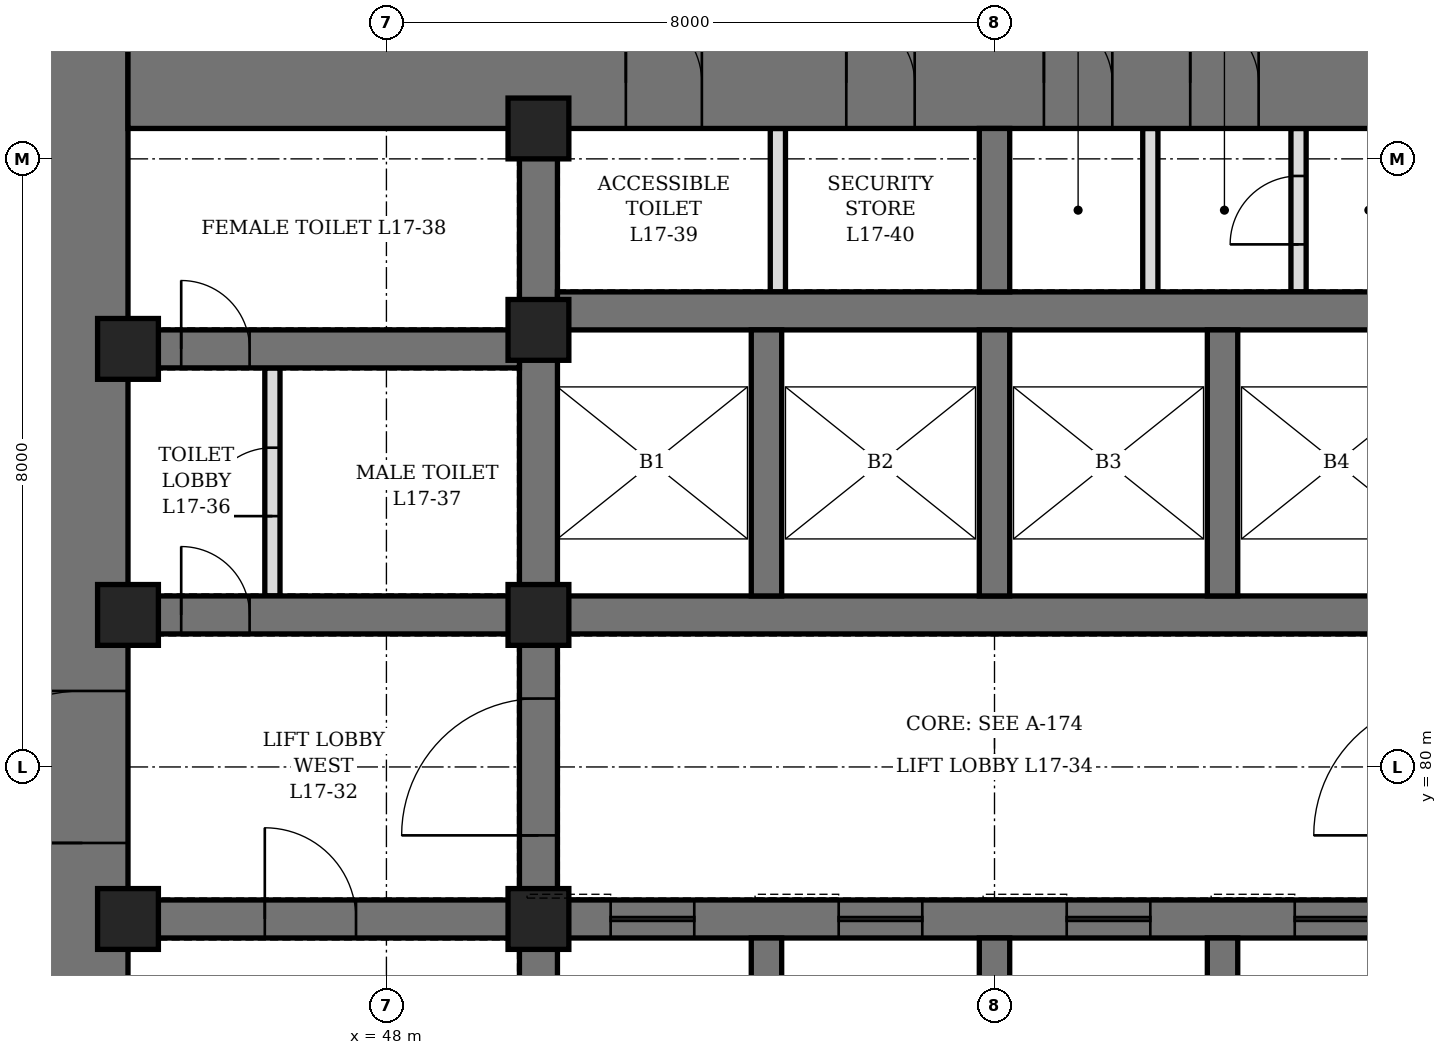
"""IFC4 building model, lengths in metres.
Left out: names, types, materials, properties, quantities, classifications, styles, units other than length and angle.
Written with IfcOpenShell. Run it as: python <this file> out.ifc"""

import sys

from ifc_helpers import new_model, si_unit, direction, frame, frame_2d, origin, origin_2d, place, context, subcontext, project, spatial, rectangle, hollow_rectangle, extrude, element, fill, save


model = new_model("IFC4")
c1 = context("Model", 3, precision=1e-05, world=origin(), true_north=direction((0.0, 1.0)))
c2 = subcontext(c1, "Body", "Model", "MODEL_VIEW")
j1 = project(units=[si_unit("LENGTHUNIT", "METRE"), si_unit("PLANEANGLEUNIT", "RADIAN")], contexts=[c1])
p1 = place(None, origin())
s1 = spatial("IfcSite", under=j1, at=p1, CompositionType="ELEMENT")
p2 = place(p1, origin())
s2 = spatial("IfcBuilding", under=s1, at=p2, CompositionType="ELEMENT")
p3 = place(p2, frame((0.0, 0.0, 81.1)))
s3 = spatial("IfcBuildingStorey", under=s2, at=p3, CompositionType="ELEMENT", Elevation=81.1)
p4 = place(p3, frame((44.0, 70.4, 0.0), z_axis=(0.0, 0.0, 1.0), x_axis=(0.0, 1.0, 0.0)))
e1 = element("IfcWall", 1, at=p4, inside=s3, PredefinedType="SHEAR", context=c2, shape_type="SweptSolid", body=[
    extrude(rectangle(XDim=19.2, YDim=1.2, at=frame_2d((9.6, 0.0))), origin(), (0.0, 0.0, 1.0), 4.2),
])
p5 = place(p4, frame((8.6, 0.0, 0.0)))
e2 = element("IfcOpeningElement", 2, at=p5, cuts=e1, PredefinedType="OPENING", context=c2, shape_type="SweptSolid", body=[
    extrude(rectangle(XDim=2.0, YDim=2.4, at=frame_2d((1.0, 1.2))), frame((0.0, 0.61, 0.0), z_axis=(0.0, -1.0, 0.0), x_axis=(1.0, 0.0, 0.0)), (0.0, 0.0, 1.0), 1.22),
])
p6 = place(p3, frame((44.6, 89.0, 0.0), z_axis=(0.0, 0.0, 1.0), x_axis=(1.0, 0.0, 0.0)))
e3 = element("IfcWall", 3, at=p6, inside=s3, PredefinedType="SHEAR", context=c2, shape_type="SweptSolid", body=[
    extrude(rectangle(XDim=22.8, YDim=1.2, at=frame_2d((11.4, 0.0))), origin(), (0.0, 0.0, 1.0), 4.2),
])
p7 = place(p6, frame((6.55, 0.0, 0.0)))
e4 = element("IfcOpeningElement", 4, at=p7, cuts=e3, PredefinedType="OPENING", context=c2, shape_type="SweptSolid", body=[
    extrude(rectangle(XDim=1.0, YDim=2.1, at=frame_2d((0.5, 1.05))), frame((0.0, 0.61, 0.0), z_axis=(0.0, -1.0, 0.0), x_axis=(1.0, 0.0, 0.0)), (0.0, 0.0, 1.0), 1.22),
])
p8 = place(p6, frame((9.45, 0.0, 0.0)))
e5 = element("IfcOpeningElement", 5, at=p8, cuts=e3, PredefinedType="OPENING", context=c2, shape_type="SweptSolid", body=[
    extrude(rectangle(XDim=0.9, YDim=2.1, at=frame_2d((0.45, 1.05))), frame((0.0, 0.61, 0.0), z_axis=(0.0, -1.0, 0.0), x_axis=(1.0, 0.0, 0.0)), (0.0, 0.0, 1.0), 1.22),
])
p9 = place(p6, frame((12.05, 0.0, 0.0)))
e6 = element("IfcOpeningElement", 6, at=p9, cuts=e3, PredefinedType="OPENING", context=c2, shape_type="SweptSolid", body=[
    extrude(rectangle(XDim=0.9, YDim=2.1, at=frame_2d((0.45, 1.05))), frame((0.0, 0.61, 0.0), z_axis=(0.0, -1.0, 0.0), x_axis=(1.0, 0.0, 0.0)), (0.0, 0.0, 1.0), 1.22),
])
p10 = place(p6, frame((13.975, 0.0, 0.0)))
e7 = element("IfcOpeningElement", 7, at=p10, cuts=e3, PredefinedType="OPENING", context=c2, shape_type="SweptSolid", body=[
    extrude(rectangle(XDim=0.9, YDim=2.1, at=frame_2d((0.45, 1.05))), frame((0.0, 0.61, 0.0), z_axis=(0.0, -1.0, 0.0), x_axis=(1.0, 0.0, 0.0)), (0.0, 0.0, 1.0), 1.22),
])
p11 = place(p3, frame((50.0, 71.6, 0.0), z_axis=(0.0, 0.0, 1.0), x_axis=(0.0, 1.0, 0.0)))
e8 = element("IfcWall", 8, at=p11, inside=s3, PredefinedType="SHEAR", context=c2, shape_type="SweptSolid", body=[
    extrude(rectangle(XDim=16.8, YDim=0.5, at=frame_2d((8.4, 0.0))), origin(), (0.0, 0.0, 1.0), 4.2),
])
p12 = place(p11, frame((7.5, 0.0, 0.0)))
e9 = element("IfcOpeningElement", 9, at=p12, cuts=e8, PredefinedType="OPENING", context=c2, shape_type="SweptSolid", body=[
    extrude(rectangle(XDim=1.8, YDim=2.4, at=frame_2d((0.9, 1.2))), frame((0.0, 0.26, 0.0), z_axis=(0.0, -1.0, 0.0), x_axis=(1.0, 0.0, 0.0)), (0.0, 0.0, 1.0), 0.52),
])
p13 = place(p3, frame((44.6, 78.0, 0.0), z_axis=(0.0, 0.0, 1.0), x_axis=(1.0, 0.0, 0.0)))
e10 = element("IfcWall", 10, at=p13, inside=s3, PredefinedType="SHEAR", context=c2, shape_type="SweptSolid", body=[
    extrude(rectangle(XDim=5.15, YDim=0.5, at=frame_2d((2.575, 0.0))), origin(), (0.0, 0.0, 1.0), 4.2),
])
p14 = place(p13, frame((1.8, 0.0, 0.0)))
e11 = element("IfcOpeningElement", 11, at=p14, cuts=e10, PredefinedType="OPENING", context=c2, shape_type="SweptSolid", body=[
    extrude(rectangle(XDim=1.2, YDim=2.1, at=frame_2d((0.6, 1.05))), frame((0.0, 0.26, 0.0), z_axis=(0.0, -1.0, 0.0), x_axis=(1.0, 0.0, 0.0)), (0.0, 0.0, 1.0), 0.52),
])
p15 = place(p3, frame((44.6, 82.0, 0.0), z_axis=(0.0, 0.0, 1.0), x_axis=(1.0, 0.0, 0.0)))
e12 = element("IfcWall", 12, at=p15, inside=s3, PredefinedType="SHEAR", context=c2, shape_type="SweptSolid", body=[
    extrude(rectangle(XDim=5.15, YDim=0.5, at=frame_2d((2.575, 0.0))), origin(), (0.0, 0.0, 1.0), 4.2),
])
p16 = place(p15, frame((0.7, 0.0, 0.0)))
e13 = element("IfcOpeningElement", 13, at=p16, cuts=e12, PredefinedType="OPENING", context=c2, shape_type="SweptSolid", body=[
    extrude(rectangle(XDim=0.9, YDim=2.1, at=frame_2d((0.45, 1.05))), frame((0.0, 0.26, 0.0), z_axis=(0.0, -1.0, 0.0), x_axis=(1.0, 0.0, 0.0)), (0.0, 0.0, 1.0), 0.52),
])
p17 = place(p3, frame((44.6, 85.5, 0.0), z_axis=(0.0, 0.0, 1.0), x_axis=(1.0, 0.0, 0.0)))
e14 = element("IfcWall", 14, at=p17, inside=s3, PredefinedType="SHEAR", context=c2, shape_type="SweptSolid", body=[
    extrude(rectangle(XDim=5.15, YDim=0.5, at=frame_2d((2.575, 0.0))), origin(), (0.0, 0.0, 1.0), 4.2),
])
p18 = place(p17, frame((0.7, 0.0, 0.0)))
e15 = element("IfcOpeningElement", 15, at=p18, cuts=e14, PredefinedType="OPENING", context=c2, shape_type="SweptSolid", body=[
    extrude(rectangle(XDim=0.9, YDim=2.1, at=frame_2d((0.45, 1.05))), frame((0.0, 0.26, 0.0), z_axis=(0.0, -1.0, 0.0), x_axis=(1.0, 0.0, 0.0)), (0.0, 0.0, 1.0), 0.52),
])
p19 = place(p3, frame((50.25, 78.0, 0.0), z_axis=(0.0, 0.0, 1.0), x_axis=(1.0, 0.0, 0.0)))
e16 = element("IfcWall", 16, at=p19, inside=s3, PredefinedType="SHEAR", context=c2, shape_type="SweptSolid", body=[
    extrude(rectangle(XDim=11.5, YDim=0.5, at=frame_2d((5.75, 0.0))), origin(), (0.0, 0.0, 1.0), 4.2),
])
p20 = place(p19, frame((0.7, 0.0, 0.0)))
e17 = element("IfcOpeningElement", 17, at=p20, cuts=e16, PredefinedType="OPENING", context=c2, shape_type="SweptSolid", body=[
    extrude(rectangle(XDim=1.1, YDim=2.2, at=frame_2d((0.55, 1.1))), frame((0.0, 0.26, 0.0), z_axis=(0.0, -1.0, 0.0), x_axis=(1.0, 0.0, 0.0)), (0.0, 0.0, 1.0), 0.52),
])
p21 = place(p19, frame((3.7, 0.0, 0.0)))
e18 = element("IfcOpeningElement", 18, at=p21, cuts=e16, PredefinedType="OPENING", context=c2, shape_type="SweptSolid", body=[
    extrude(rectangle(XDim=1.1, YDim=2.2, at=frame_2d((0.55, 1.1))), frame((0.0, 0.26, 0.0), z_axis=(0.0, -1.0, 0.0), x_axis=(1.0, 0.0, 0.0)), (0.0, 0.0, 1.0), 0.52),
])
p22 = place(p19, frame((6.7, 0.0, 0.0)))
e19 = element("IfcOpeningElement", 19, at=p22, cuts=e16, PredefinedType="OPENING", context=c2, shape_type="SweptSolid", body=[
    extrude(rectangle(XDim=1.1, YDim=2.2, at=frame_2d((0.55, 1.1))), frame((0.0, 0.26, 0.0), z_axis=(0.0, -1.0, 0.0), x_axis=(1.0, 0.0, 0.0)), (0.0, 0.0, 1.0), 0.52),
])
p23 = place(p19, frame((9.7, 0.0, 0.0)))
e20 = element("IfcOpeningElement", 20, at=p23, cuts=e16, PredefinedType="OPENING", context=c2, shape_type="SweptSolid", body=[
    extrude(rectangle(XDim=1.1, YDim=2.2, at=frame_2d((0.55, 1.1))), frame((0.0, 0.26, 0.0), z_axis=(0.0, -1.0, 0.0), x_axis=(1.0, 0.0, 0.0)), (0.0, 0.0, 1.0), 0.52),
])
for number, where, z_axis, x_axis in (
    (21, (50.25, 82.0, 0.0), (0.0, 0.0, 1.0), (1.0, 0.0, 0.0)),
    (22, (50.25, 86.0, 0.0), (0.0, 0.0, 1.0), (1.0, 0.0, 0.0)),
):
    element("IfcWall", number, at=place(p3, frame(where, z_axis=z_axis, x_axis=x_axis)), inside=s3, PredefinedType="SHEAR", context=c2, shape_type="SweptSolid", body=[
        extrude(rectangle(XDim=11.5, YDim=0.5, at=frame_2d((5.75, 0.0))), origin(), (0.0, 0.0, 1.0), 4.2),
    ])
p24 = place(p3, frame((53.0, 74.2, 0.0), z_axis=(0.0, 0.0, 1.0), x_axis=(0.0, 1.0, 0.0)))
e23 = element("IfcWall", 23, at=p24, inside=s3, PredefinedType="SHEAR", context=c2, shape_type="SweptSolid", body=[
    extrude(rectangle(XDim=3.55, YDim=0.4, at=frame_2d((1.775, 0.0))), origin(), (0.0, 0.0, 1.0), 4.2),
])
p25 = place(p3, frame((53.0, 82.25, 0.0), z_axis=(0.0, 0.0, 1.0), x_axis=(0.0, 1.0, 0.0)))
e24 = element("IfcWall", 24, at=p25, inside=s3, PredefinedType="SHEAR", context=c2, shape_type="SweptSolid", body=[
    extrude(rectangle(XDim=3.5, YDim=0.4, at=frame_2d((1.75, 0.0))), origin(), (0.0, 0.0, 1.0), 4.2),
])
p26 = place(p3, frame((56.0, 74.2, 0.0), z_axis=(0.0, 0.0, 1.0), x_axis=(0.0, 1.0, 0.0)))
e25 = element("IfcWall", 25, at=p26, inside=s3, PredefinedType="SHEAR", context=c2, shape_type="SweptSolid", body=[
    extrude(rectangle(XDim=3.55, YDim=0.4, at=frame_2d((1.775, 0.0))), origin(), (0.0, 0.0, 1.0), 4.2),
])
p27 = place(p3, frame((56.0, 82.25, 0.0), z_axis=(0.0, 0.0, 1.0), x_axis=(0.0, 1.0, 0.0)))
e26 = element("IfcWall", 26, at=p27, inside=s3, PredefinedType="SHEAR", context=c2, shape_type="SweptSolid", body=[
    extrude(rectangle(XDim=3.5, YDim=0.4, at=frame_2d((1.75, 0.0))), origin(), (0.0, 0.0, 1.0), 4.2),
])
p28 = place(p3, frame((59.0, 74.2, 0.0), z_axis=(0.0, 0.0, 1.0), x_axis=(0.0, 1.0, 0.0)))
e27 = element("IfcWall", 27, at=p28, inside=s3, PredefinedType="SHEAR", context=c2, shape_type="SweptSolid", body=[
    extrude(rectangle(XDim=3.55, YDim=0.4, at=frame_2d((1.775, 0.0))), origin(), (0.0, 0.0, 1.0), 4.2),
])
p29 = place(p3, frame((59.0, 82.25, 0.0), z_axis=(0.0, 0.0, 1.0), x_axis=(0.0, 1.0, 0.0)))
e28 = element("IfcWall", 28, at=p29, inside=s3, PredefinedType="SHEAR", context=c2, shape_type="SweptSolid", body=[
    extrude(rectangle(XDim=3.5, YDim=0.4, at=frame_2d((1.75, 0.0))), origin(), (0.0, 0.0, 1.0), 4.2),
])
p30 = place(p3, frame((56.0, 86.25, 0.0), z_axis=(0.0, 0.0, 1.0), x_axis=(0.0, 1.0, 0.0)))
e29 = element("IfcWall", 29, at=p30, inside=s3, PredefinedType="SHEAR", context=c2, shape_type="SweptSolid", body=[
    extrude(rectangle(XDim=2.15, YDim=0.4, at=frame_2d((1.075, 0.0))), origin(), (0.0, 0.0, 1.0), 4.2),
])
for number, where, z_axis, x_axis in (
    (30, (44.6, 78.0, 0.0), (0.0, 0.0, 1.0), (1.0, 0.0, 0.0)),
    (31, (44.6, 82.0, 0.0), (0.0, 0.0, 1.0), (1.0, 0.0, 0.0)),
    (32, (44.6, 85.5, 0.0), (0.0, 0.0, 1.0), (1.0, 0.0, 0.0)),
    (33, (50.0, 78.0, 0.0), (0.0, 0.0, 1.0), (1.0, 0.0, 0.0)),
    (34, (50.0, 82.0, 0.0), (0.0, 0.0, 1.0), (1.0, 0.0, 0.0)),
    (35, (50.0, 85.75, 0.0), (0.0, 0.0, 1.0), (1.0, 0.0, 0.0)),
    (36, (50.0, 88.4, 0.0), (0.0, 0.0, 1.0), (1.0, 0.0, 0.0)),
):
    element("IfcColumn", number, at=place(p3, frame(where, z_axis=z_axis, x_axis=x_axis)), inside=s3, PredefinedType="COLUMN", context=c2, shape_type="SweptSolid", body=[
        extrude(hollow_rectangle(XDim=0.8, YDim=0.8, WallThickness=0.1, at=origin_2d()), origin(), (0.0, 0.0, 1.0), 4.2),
    ])
p31 = place(p3, frame((46.5, 82.25, 0.0), z_axis=(0.0, 0.0, 1.0), x_axis=(0.0, 1.0, 0.0)))
e37 = element("IfcWall", 37, at=p31, inside=s3, PredefinedType="PARTITIONING", context=c2, shape_type="SweptSolid", body=[
    extrude(rectangle(XDim=3.0, YDim=0.2, at=frame_2d((1.5, 0.0))), origin(), (0.0, 0.0, 1.0), 4.04),
])
p32 = place(p31, frame((1.05, 0.0, 0.0)))
e38 = element("IfcOpeningElement", 38, at=p32, cuts=e37, PredefinedType="OPENING", context=c2, shape_type="SweptSolid", body=[
    extrude(rectangle(XDim=0.9, YDim=2.1, at=frame_2d((0.45, 1.05))), frame((0.0, 0.11, 0.0), z_axis=(0.0, -1.0, 0.0), x_axis=(1.0, 0.0, 0.0)), (0.0, 0.0, 1.0), 0.22),
])
p33 = place(p3, frame((53.15, 86.25, 0.0), z_axis=(0.0, 0.0, 1.0), x_axis=(0.0, 1.0, 0.0)))
e39 = element("IfcWall", 39, at=p33, inside=s3, PredefinedType="PARTITIONING", context=c2, shape_type="SweptSolid", body=[
    extrude(rectangle(XDim=2.15, YDim=0.2, at=frame_2d((1.075, 0.0))), origin(), (0.0, 0.0, 1.0), 3.14),
])
p34 = place(p3, frame((60.0, 86.25, 0.0), z_axis=(0.0, 0.0, 1.0), x_axis=(0.0, 1.0, 0.0)))
e40 = element("IfcWall", 40, at=p34, inside=s3, PredefinedType="PARTITIONING", context=c2, shape_type="SweptSolid", body=[
    extrude(rectangle(XDim=2.15, YDim=0.2, at=frame_2d((1.075, 0.0))), origin(), (0.0, 0.0, 1.0), 4.04),
])
p35 = place(p34, frame((0.625, 0.0, 0.0)))
e41 = element("IfcOpeningElement", 41, at=p35, cuts=e40, PredefinedType="OPENING", context=c2, shape_type="SweptSolid", body=[
    extrude(rectangle(XDim=0.9, YDim=2.1, at=frame_2d((0.45, 1.05))), frame((0.0, 0.11, 0.0), z_axis=(0.0, -1.0, 0.0), x_axis=(1.0, 0.0, 0.0)), (0.0, 0.0, 1.0), 0.22),
])
p36 = place(p3, frame((58.05, 86.25, 0.0), z_axis=(0.0, 0.0, 1.0), x_axis=(0.0, 1.0, 0.0)))
e42 = element("IfcWall", 42, at=p36, inside=s3, PredefinedType="PARTITIONING", context=c2, shape_type="SweptSolid", body=[
    extrude(rectangle(XDim=2.15, YDim=0.2, at=frame_2d((1.075, 0.0))), origin(), (0.0, 0.0, 1.0), 4.04),
])
p37 = place(p16, origin())
e43 = element("IfcDoor", 43, at=p37, inside=s3, OperationType="SINGLE_SWING_LEFT", PredefinedType="DOOR", context=c2, shape_type="SweptSolid", body=[
    extrude(rectangle(XDim=0.9, YDim=2.1, at=frame_2d((0.45, 1.05))), frame((0.0, 0.25, 0.0), z_axis=(0.0, -1.0, 0.0), x_axis=(1.0, 0.0, 0.0)), (0.0, 0.0, 1.0), 0.5),
])
fill(e13, e43)
p38 = place(p32, origin())
e44 = element("IfcDoor", 44, at=p38, inside=s3, OperationType="SINGLE_SWING_RIGHT", PredefinedType="DOOR", context=c2, shape_type="SweptSolid", body=[
    extrude(rectangle(XDim=0.9, YDim=2.1, at=frame_2d((0.45, 1.05))), frame((0.0, 0.1, 0.0), z_axis=(0.0, -1.0, 0.0), x_axis=(1.0, 0.0, 0.0)), (0.0, 0.0, 1.0), 0.199),
])
fill(e38, e44)
p39 = place(p18, origin())
e45 = element("IfcDoor", 45, at=p39, inside=s3, OperationType="SINGLE_SWING_RIGHT", PredefinedType="DOOR", context=c2, shape_type="SweptSolid", body=[
    extrude(rectangle(XDim=0.9, YDim=2.1, at=frame_2d((0.45, 1.05))), frame((0.0, 0.25, 0.0), z_axis=(0.0, -1.0, 0.0), x_axis=(1.0, 0.0, 0.0)), (0.0, 0.0, 1.0), 0.5),
])
fill(e15, e45)
p40 = place(p7, origin())
e46 = element("IfcDoor", 46, at=p40, inside=s3, OperationType="SINGLE_SWING_LEFT", PredefinedType="DOOR", context=c2, shape_type="SweptSolid", body=[
    extrude(rectangle(XDim=1.0, YDim=2.1, at=frame_2d((0.5, 1.05))), frame((0.0, 0.35, 0.0), z_axis=(0.0, -1.0, 0.0), x_axis=(1.0, 0.0, 0.0)), (0.0, 0.0, 1.0), 0.7),
])
fill(e4, e46)
p41 = place(p8, origin())
e47 = element("IfcDoor", 47, at=p41, inside=s3, OperationType="SINGLE_SWING_LEFT", PredefinedType="DOOR", context=c2, shape_type="SweptSolid", body=[
    extrude(rectangle(XDim=0.9, YDim=2.1, at=frame_2d((0.45, 1.05))), frame((0.0, 0.35, 0.0), z_axis=(0.0, -1.0, 0.0), x_axis=(1.0, 0.0, 0.0)), (0.0, 0.0, 1.0), 0.7),
])
fill(e5, e47)
p42 = place(p9, origin())
e48 = element("IfcDoor", 48, at=p42, inside=s3, OperationType="SINGLE_SWING_LEFT", PredefinedType="DOOR", context=c2, shape_type="SweptSolid", body=[
    extrude(rectangle(XDim=0.9, YDim=2.1, at=frame_2d((0.45, 1.05))), frame((0.0, 0.35, 0.0), z_axis=(0.0, -1.0, 0.0), x_axis=(1.0, 0.0, 0.0)), (0.0, 0.0, 1.0), 0.7),
])
fill(e6, e48)
p43 = place(p10, origin())
e49 = element("IfcDoor", 49, at=p43, inside=s3, OperationType="SINGLE_SWING_LEFT", PredefinedType="DOOR", context=c2, shape_type="SweptSolid", body=[
    extrude(rectangle(XDim=0.9, YDim=2.1, at=frame_2d((0.45, 1.05))), frame((0.0, 0.35, 0.0), z_axis=(0.0, -1.0, 0.0), x_axis=(1.0, 0.0, 0.0)), (0.0, 0.0, 1.0), 0.7),
])
fill(e7, e49)
p44 = place(p35, origin())
e50 = element("IfcDoor", 50, at=p44, inside=s3, OperationType="SINGLE_SWING_LEFT", PredefinedType="DOOR", context=c2, shape_type="SweptSolid", body=[
    extrude(rectangle(XDim=0.9, YDim=2.1, at=frame_2d((0.45, 1.05))), frame((0.0, 0.1, 0.0), z_axis=(0.0, -1.0, 0.0), x_axis=(1.0, 0.0, 0.0)), (0.0, 0.0, 1.0), 0.199),
])
fill(e41, e50)
p45 = place(p14, origin())
e51 = element("IfcDoor", 51, at=p45, inside=s3, OperationType="SINGLE_SWING_LEFT", PredefinedType="DOOR", context=c2, shape_type="SweptSolid", body=[
    extrude(rectangle(XDim=1.2, YDim=2.1, at=frame_2d((0.6, 1.05))), frame((0.0, 0.25, 0.0), z_axis=(0.0, -1.0, 0.0), x_axis=(1.0, 0.0, 0.0)), (0.0, 0.0, 1.0), 0.5),
])
fill(e11, e51)
p46 = place(p5, origin())
e52 = element("IfcDoor", 52, at=p46, inside=s3, OperationType="DOUBLE_DOOR_SINGLE_SWING", PredefinedType="DOOR", context=c2, shape_type="SweptSolid", body=[
    extrude(rectangle(XDim=2.0, YDim=2.4, at=frame_2d((1.0, 1.2))), frame((0.0, 0.35, 0.0), z_axis=(0.0, -1.0, 0.0), x_axis=(1.0, 0.0, 0.0)), (0.0, 0.0, 1.0), 0.7),
])
fill(e2, e52)
p47 = place(p12, origin())
e53 = element("IfcDoor", 53, at=p47, inside=s3, OperationType="DOUBLE_DOOR_SINGLE_SWING", PredefinedType="DOOR", context=c2, shape_type="SweptSolid", body=[
    extrude(rectangle(XDim=1.8, YDim=2.4, at=frame_2d((0.9, 1.2))), frame((0.0, 0.25, 0.0), z_axis=(0.0, -1.0, 0.0), x_axis=(1.0, 0.0, 0.0)), (0.0, 0.0, 1.0), 0.5),
])
fill(e9, e53)
p48 = place(p20, origin())
e54 = element("IfcDoor", 54, at=p48, inside=s3, OperationType="SLIDING_TO_LEFT", PredefinedType="DOOR", context=c2, shape_type="SweptSolid", body=[
    extrude(rectangle(XDim=1.1, YDim=2.2, at=frame_2d((0.55, 1.1))), frame((0.0, 0.25, 0.0), z_axis=(0.0, -1.0, 0.0), x_axis=(1.0, 0.0, 0.0)), (0.0, 0.0, 1.0), 0.5),
])
fill(e17, e54)
p49 = place(p21, origin())
e55 = element("IfcDoor", 55, at=p49, inside=s3, OperationType="SLIDING_TO_LEFT", PredefinedType="DOOR", context=c2, shape_type="SweptSolid", body=[
    extrude(rectangle(XDim=1.1, YDim=2.2, at=frame_2d((0.55, 1.1))), frame((0.0, 0.25, 0.0), z_axis=(0.0, -1.0, 0.0), x_axis=(1.0, 0.0, 0.0)), (0.0, 0.0, 1.0), 0.5),
])
fill(e18, e55)
p50 = place(p22, origin())
e56 = element("IfcDoor", 56, at=p50, inside=s3, OperationType="SLIDING_TO_LEFT", PredefinedType="DOOR", context=c2, shape_type="SweptSolid", body=[
    extrude(rectangle(XDim=1.1, YDim=2.2, at=frame_2d((0.55, 1.1))), frame((0.0, 0.25, 0.0), z_axis=(0.0, -1.0, 0.0), x_axis=(1.0, 0.0, 0.0)), (0.0, 0.0, 1.0), 0.5),
])
fill(e19, e56)
p51 = place(p23, origin())
e57 = element("IfcDoor", 57, at=p51, inside=s3, OperationType="SLIDING_TO_LEFT", PredefinedType="DOOR", context=c2, shape_type="SweptSolid", body=[
    extrude(rectangle(XDim=1.1, YDim=2.2, at=frame_2d((0.55, 1.1))), frame((0.0, 0.25, 0.0), z_axis=(0.0, -1.0, 0.0), x_axis=(1.0, 0.0, 0.0)), (0.0, 0.0, 1.0), 0.5),
])
fill(e20, e57)
save(model, sys.argv[1])
